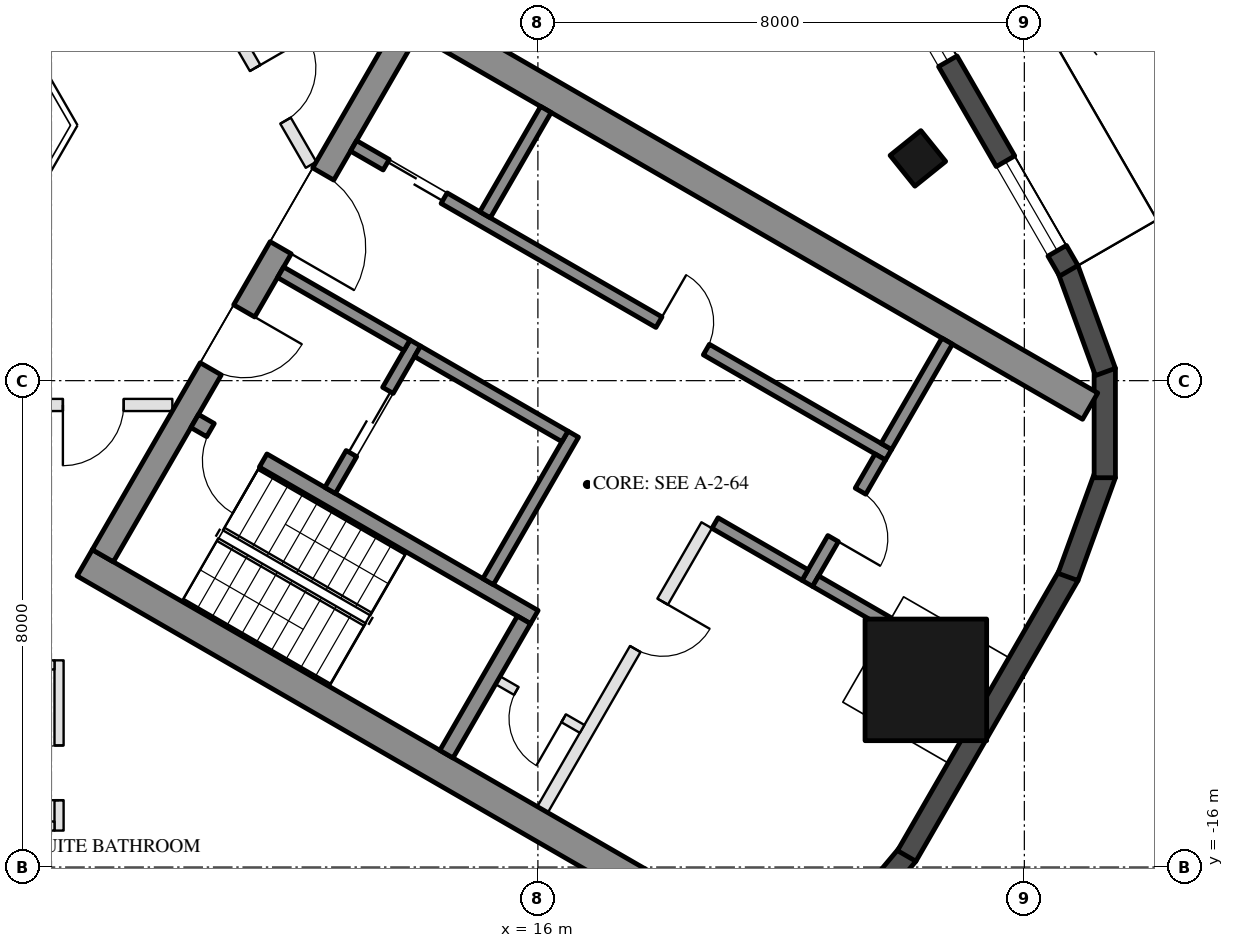
"""IFC4 building model, lengths in metres.
Left out: names, types, materials, properties, quantities, classifications, styles, units other than length and angle.
Written with IfcOpenShell. Run it as: python <this file> out.ifc"""

import sys

from ifc_helpers import new_model, si_unit, direction, frame, frame_2d, origin, origin_2d, place, context, subcontext, project, spatial, rectangle, hollow_rectangle, extrude, boolean, halfspace, element, fill, save


model = new_model("IFC4")
c1 = context("Model", 3, precision=1e-05, world=origin(), true_north=direction((0.0, 1.0)))
c2 = subcontext(c1, "Body", "Model", "MODEL_VIEW")
j1 = project(units=[si_unit("LENGTHUNIT", "METRE"), si_unit("PLANEANGLEUNIT", "RADIAN")], contexts=[c1])
p1 = place(None, origin())
s1 = spatial("IfcSite", under=j1, at=p1, CompositionType="ELEMENT")
p2 = place(p1, origin())
s2 = spatial("IfcBuilding", under=s1, at=p2, CompositionType="ELEMENT")
p3 = place(p2, frame((0.0, 0.0, 276.3)))
s3 = spatial("IfcBuildingStorey", under=s2, at=p3, CompositionType="ELEMENT", Elevation=276.3)
p4 = place(p3, frame((22.249, -4.345, 0.0), z_axis=(-0.190797858838, 0.029652330963, 0.981181388088), x_axis=(0.488223592572, -0.864281582532, 0.12105812551)))
e1 = element("IfcColumn", 1, at=p4, inside=s3, PredefinedType="COLUMN", context=c2, shape_type="SweptSolid", body=[
    boolean("DIFFERENCE", boolean("DIFFERENCE", extrude(hollow_rectangle(XDim=0.65, YDim=0.65, WallThickness=0.03, at=origin_2d()), origin(), (0.0, 0.0, 1.0), 3.771), halfspace(frame((0.0, 0.0, 0.047), z_axis=(0.0, 0.0, 1.0), x_axis=(1.0, 0.0, 0.0)), True)), halfspace(frame((0.0, 0.0, 3.724), z_axis=(0.0, 0.0, 1.0), x_axis=(1.0, 0.0, 0.0)), False)),
])
p5 = place(p3, frame((22.38, -12.921, 0.0), z_axis=(-0.190406849863, 0.109944185114, 0.975529347424), x_axis=(-0.499999219142, -0.866025854536, 1.1512328e-05)))
e2 = element("IfcColumn", 2, at=p5, inside=s3, PredefinedType="COLUMN", context=c2, shape_type="SweptSolid", body=[
    boolean("DIFFERENCE", boolean("DIFFERENCE", extrude(hollow_rectangle(XDim=2.0, YDim=2.0, WallThickness=0.05, at=origin_2d()), origin(), (0.0, 0.0, 1.0), 3.793), halfspace(frame((0.0, 0.0, 0.113), z_axis=(0.0, 0.0, 1.0), x_axis=(1.0, 0.0, 0.0)), True)), halfspace(frame((0.0, 0.0, 3.679), z_axis=(0.0, 0.0, 1.0), x_axis=(1.0, 0.0, 0.0)), False)),
])
p6 = place(p3, frame((20.926, -17.171, 0.0), z_axis=(0.0, 0.0, 1.0), x_axis=(0.642756114672, 0.766070869471, 0.0)))
e3 = element("IfcWall", 3, at=p6, inside=s3, PredefinedType="SOLIDWALL", context=c2, shape_type="SweptSolid", body=[
    extrude(rectangle(XDim=1.8, YDim=0.35, at=frame_2d((0.9, 0.0))), origin(), (0.0, 0.0, 1.0), 3.55),
])
p7 = place(p3, frame((22.065, -15.817, 0.0), z_axis=(0.0, 0.0, 1.0), x_axis=(0.500025039717, 0.866010946615, 0.0)))
e4 = element("IfcWall", 4, at=p7, inside=s3, PredefinedType="SOLIDWALL", context=c2, shape_type="SweptSolid", body=[
    extrude(rectangle(XDim=5.331, YDim=0.35, at=frame_2d((2.666, 0.0))), origin(), (0.0, 0.0, 1.0), 3.55),
])
p8 = place(p3, frame((24.718, -11.228, 0.0), z_axis=(0.0, 0.0, 1.0), x_axis=(0.34206975284, 0.939674562916, 0.0)))
e5 = element("IfcWall", 5, at=p8, inside=s3, PredefinedType="SOLIDWALL", context=c2, shape_type="SweptSolid", body=[
    extrude(rectangle(XDim=1.8, YDim=0.35, at=frame_2d((0.9, 0.0))), origin(), (0.0, 0.0, 1.0), 3.55),
])
p9 = place(p3, frame((25.323, -9.597, 0.0), z_axis=(0.0, 0.0, 1.0), x_axis=(0.0, 1.0, 0.0)))
e6 = element("IfcWall", 6, at=p9, inside=s3, PredefinedType="SOLIDWALL", context=c2, shape_type="SweptSolid", body=[
    extrude(rectangle(XDim=1.8, YDim=0.35, at=frame_2d((0.9, 0.0))), origin(), (0.0, 0.0, 1.0), 3.55),
])
p10 = place(p3, frame((25.333, -7.857, 0.0), z_axis=(0.0, 0.0, 1.0), x_axis=(-0.34206975284, 0.939674562916, 0.0)))
e7 = element("IfcWall", 7, at=p10, inside=s3, PredefinedType="SOLIDWALL", context=c2, shape_type="SweptSolid", body=[
    extrude(rectangle(XDim=1.8, YDim=0.35, at=frame_2d((0.9, 0.0))), origin(), (0.0, 0.0, 1.0), 3.55),
])
p11 = place(p3, frame((24.731, -6.193, 0.0), z_axis=(0.0, 0.0, 1.0), x_axis=(-0.500007749075, 0.866020929808, 0.0)))
e8 = element("IfcWall", 8, at=p11, inside=s3, PredefinedType="SOLIDWALL", context=c2, shape_type="SweptSolid", body=[
    extrude(rectangle(XDim=11.185, YDim=0.35, at=frame_2d((5.593, 0.0))), origin(), (0.0, 0.0, 1.0), 3.55),
])
p12 = place(p11, frame((0.381, 0.0, 0.3)))
e9 = element("IfcOpeningElement", 9, at=p12, cuts=e8, PredefinedType="OPENING", context=c2, shape_type="SweptSolid", body=[
    extrude(rectangle(XDim=1.7, YDim=2.65, at=frame_2d((0.85, 1.325))), frame((0.0, 0.185, 0.0), z_axis=(0.0, -1.0, 0.0), x_axis=(1.0, 0.0, 0.0)), (0.0, 0.0, 1.0), 0.37),
])
p13 = place(p11, frame((7.205, 0.0, 0.0)))
e10 = element("IfcOpeningElement", 10, at=p13, cuts=e8, PredefinedType="OPENING", context=c2, shape_type="SweptSolid", body=[
    extrude(rectangle(XDim=2.4, YDim=2.4, at=frame_2d((1.2, 1.2))), frame((0.0, 0.185, 0.0), z_axis=(0.0, -1.0, 0.0), x_axis=(1.0, 0.0, 0.0)), (0.0, 0.0, 1.0), 0.37),
])
p14 = place(p11, frame((3.979, 0.0, 0.3)))
e11 = element("IfcOpeningElement", 11, at=p14, cuts=e8, PredefinedType="OPENING", context=c2, shape_type="SweptSolid", body=[
    extrude(rectangle(XDim=2.9, YDim=2.65, at=frame_2d((1.45, 1.325))), frame((0.0, 0.185, 0.0), z_axis=(0.0, -1.0, 0.0), x_axis=(1.0, 0.0, 0.0)), (0.0, 0.0, 1.0), 0.37),
])
for number, where, z_axis, x_axis in (
    (12, (8.547, -10.997, 0.0), (0.0, 0.0, 1.0), (0.866, -0.5, 0.0)),
    (13, (13.797, -1.903, 0.0), (0.0, 0.0, 1.0), (0.866, -0.5, 0.0)),
):
    element("IfcWall", number, at=place(p3, frame(where, z_axis=z_axis, x_axis=x_axis)), inside=s3, PredefinedType="SHEAR", context=c2, shape_type="SweptSolid", body=[
        extrude(rectangle(XDim=13.031, YDim=0.5, at=frame_2d((6.516, 0.0))), origin(), (0.0, 0.0, 1.0), 3.5),
    ])
p15 = place(p3, frame((8.845, -10.88, 0.0), z_axis=(0.0, 0.0, 1.0), x_axis=(0.500004234368, 0.866022959057, 0.0)))
e14 = element("IfcWall", 14, at=p15, inside=s3, PredefinedType="SHEAR", context=c2, shape_type="SweptSolid", body=[
    extrude(rectangle(XDim=10.0, YDim=0.4, at=frame_2d((5.0, 0.0))), origin(), (0.0, 0.0, 1.0), 3.5),
])
p16 = place(p15, frame((3.55, 0.0, 0.0)))
e15 = element("IfcOpeningElement", 15, at=p16, cuts=e14, PredefinedType="OPENING", context=c2, shape_type="SweptSolid", body=[
    extrude(rectangle(XDim=1.1, YDim=2.1, at=frame_2d((0.55, 1.05))), frame((0.0, 0.21, 0.0), z_axis=(0.0, -1.0, 0.0), x_axis=(1.0, 0.0, 0.0)), (0.0, 0.0, 1.0), 0.42),
])
p17 = place(p15, frame((5.85, 0.0, 0.0)))
e16 = element("IfcOpeningElement", 16, at=p17, cuts=e14, PredefinedType="OPENING", context=c2, shape_type="SweptSolid", body=[
    extrude(rectangle(XDim=1.4, YDim=2.1, at=frame_2d((0.7, 1.05))), frame((0.0, 0.21, 0.0), z_axis=(0.0, -1.0, 0.0), x_axis=(1.0, 0.0, 0.0)), (0.0, 0.0, 1.0), 0.42),
])
p18 = place(p3, frame((10.356, -8.664, 0.0), z_axis=(0.0, 0.0, 1.0), x_axis=(0.866028629588, -0.499994412703, 0.0)))
e17 = element("IfcWall", 17, at=p18, inside=s3, PredefinedType="SHEAR", context=c2, shape_type="SweptSolid", body=[
    extrude(rectangle(XDim=6.45, YDim=0.25, at=frame_2d((3.225, 0.0))), origin(), (0.0, 0.0, 1.0), 3.5),
])
p19 = place(p18, frame((0.3, 0.0, 0.0)))
e18 = element("IfcOpeningElement", 18, at=p19, cuts=e17, PredefinedType="OPENING", context=c2, shape_type="SweptSolid", body=[
    extrude(rectangle(XDim=1.0, YDim=2.1, at=frame_2d((0.5, 1.05))), frame((0.0, 0.135, 0.0), z_axis=(0.0, -1.0, 0.0), x_axis=(1.0, 0.0, 0.0)), (0.0, 0.0, 1.0), 0.27),
])
p20 = place(p3, frame((14.496, -14.143, 0.0), z_axis=(0.0, 0.0, 1.0), x_axis=(0.500062241894, 0.865989465428, 0.0)))
e19 = element("IfcWall", 19, at=p20, inside=s3, PredefinedType="SHEAR", context=c2, shape_type="SweptSolid", body=[
    extrude(rectangle(XDim=2.55, YDim=0.25, at=frame_2d((1.275, 0.0))), origin(), (0.0, 0.0, 1.0), 3.5),
])
p21 = place(p3, frame((15.181, -11.305, 0.0), z_axis=(0.0, 0.0, 1.0), x_axis=(0.49994636267, 0.866056369097, 0.0)))
e20 = element("IfcWall", 20, at=p21, inside=s3, PredefinedType="SHEAR", context=c2, shape_type="SweptSolid", body=[
    extrude(rectangle(XDim=2.8, YDim=0.2, at=frame_2d((1.4, 0.0))), origin(), (0.0, 0.0, 1.0), 3.5),
])
p22 = place(p3, frame((12.583, -9.805, 0.0), z_axis=(0.0, 0.0, 1.0), x_axis=(0.49994636267, 0.866056369097, 0.0)))
e21 = element("IfcWall", 21, at=p22, inside=s3, PredefinedType="SHEAR", context=c2, shape_type="SweptSolid", body=[
    extrude(rectangle(XDim=2.8, YDim=0.2, at=frame_2d((1.4, 0.0))), origin(), (0.0, 0.0, 1.0), 3.5),
])
p23 = place(p22, frame((0.7, 0.0, 0.0)))
e22 = element("IfcOpeningElement", 22, at=p23, cuts=e21, PredefinedType="OPENING", context=c2, shape_type="SweptSolid", body=[
    extrude(rectangle(XDim=1.2, YDim=2.1, at=frame_2d((0.6, 1.05))), frame((0.0, 0.11, 0.0), z_axis=(0.0, -1.0, 0.0), x_axis=(1.0, 0.0, 0.0)), (0.0, 0.0, 1.0), 0.22),
])
p24 = place(p3, frame((11.768, -6.217, 0.0), z_axis=(0.0, 0.0, 1.0), x_axis=(0.866050077142, -0.499957262057, 0.0)))
e23 = element("IfcWall", 23, at=p24, inside=s3, PredefinedType="SHEAR", context=c2, shape_type="SweptSolid", body=[
    extrude(rectangle(XDim=2.4, YDim=0.2, at=frame_2d((1.2, 0.0))), origin(), (0.0, 0.0, 1.0), 3.5),
])
p25 = place(p3, frame((14.02, -7.517, 0.0), z_axis=(0.0, 0.0, 1.0), x_axis=(0.866034573852, -0.49998411664, 0.0)))
e24 = element("IfcWall", 24, at=p25, inside=s3, PredefinedType="SHEAR", context=c2, shape_type="SweptSolid", body=[
    extrude(rectangle(XDim=2.8, YDim=0.2, at=frame_2d((1.4, 0.0))), origin(), (0.0, 0.0, 1.0), 3.5),
])
p26 = place(p3, frame((12.968, -4.138, 0.0), z_axis=(0.0, 0.0, 1.0), x_axis=(0.866028328073, -0.49999493495, 0.0)))
e25 = element("IfcWall", 25, at=p26, inside=s3, PredefinedType="SHEAR", context=c2, shape_type="SweptSolid", body=[
    extrude(rectangle(XDim=10.16, YDim=0.2, at=frame_2d((5.08, 0.0))), origin(), (0.0, 0.0, 1.0), 3.5),
])
p27 = place(p26, frame((0.62, 0.0, 0.0)))
e26 = element("IfcOpeningElement", 26, at=p27, cuts=e25, PredefinedType="OPENING", context=c2, shape_type="SweptSolid", body=[
    extrude(rectangle(XDim=1.1, YDim=2.1, at=frame_2d((0.55, 1.05))), frame((0.0, 0.11, 0.0), z_axis=(0.0, -1.0, 0.0), x_axis=(1.0, 0.0, 0.0)), (0.0, 0.0, 1.0), 0.22),
])
p28 = place(p26, frame((5.8, 0.0, 0.0)))
e27 = element("IfcOpeningElement", 27, at=p28, cuts=e25, PredefinedType="OPENING", context=c2, shape_type="SweptSolid", body=[
    extrude(rectangle(XDim=0.9, YDim=2.1, at=frame_2d((0.45, 1.05))), frame((0.0, 0.11, 0.0), z_axis=(0.0, -1.0, 0.0), x_axis=(1.0, 0.0, 0.0)), (0.0, 0.0, 1.0), 0.22),
])
p29 = place(p3, frame((20.43, -11.333, 0.0), z_axis=(0.0, 0.0, 1.0), x_axis=(0.500001309137, 0.866024647952, 0.0)))
e28 = element("IfcWall", 28, at=p29, inside=s3, PredefinedType="SHEAR", context=c2, shape_type="SweptSolid", body=[
    extrude(rectangle(XDim=2.4, YDim=0.2, at=frame_2d((1.2, 0.0))), origin(), (0.0, 0.0, 1.0), 3.5),
])
p30 = place(p29, frame((0.85, 0.0, 0.0)))
e29 = element("IfcOpeningElement", 29, at=p30, cuts=e28, PredefinedType="OPENING", context=c2, shape_type="SweptSolid", body=[
    extrude(rectangle(XDim=0.9, YDim=2.1, at=frame_2d((0.45, 1.05))), frame((0.0, 0.11, 0.0), z_axis=(0.0, -1.0, 0.0), x_axis=(1.0, 0.0, 0.0)), (0.0, 0.0, 1.0), 0.22),
])
p31 = place(p3, frame((18.913, -10.342, 0.0), z_axis=(0.0, 0.0, 1.0), x_axis=(0.866038183914, -0.499977863513, 0.0)))
e30 = element("IfcWall", 30, at=p31, inside=s3, PredefinedType="SHEAR", context=c2, shape_type="SweptSolid", body=[
    extrude(rectangle(XDim=1.71, YDim=0.2, at=frame_2d((0.855, 0.0))), origin(), (0.0, 0.0, 1.0), 3.5),
])
for number, where, z_axis, x_axis in (
    (31, (15.131, -5.272, 0.0), (0.0, 0.0, 1.0), (0.5, 0.866, 0.0)),
    (32, (21.73, -9.082, 0.0), (0.0, 0.0, 1.0), (0.5, 0.866, 0.0)),
):
    element("IfcWall", number, at=place(p3, frame(where, z_axis=z_axis, x_axis=x_axis)), inside=s3, PredefinedType="SHEAR", context=c2, shape_type="SweptSolid", body=[
        extrude(rectangle(XDim=2.0, YDim=0.2, at=frame_2d((1.0, 0.0))), origin(), (0.0, 0.0, 1.0), 3.5),
    ])
p32 = place(p3, frame((20.567, -11.297, 0.0), z_axis=(0.0, 0.0, 1.0), x_axis=(0.866094443108, -0.499880401313, 0.0)))
e33 = element("IfcWall", 33, at=p32, inside=s3, PredefinedType="SHEAR", context=c2, shape_type="SweptSolid", body=[
    extrude(rectangle(XDim=1.383, YDim=0.2, at=frame_2d((0.691, 0.0))), origin(), (0.0, 0.0, 1.0), 3.5),
])
p33 = place(p3, frame((16.076, -15.055, 0.0), z_axis=(0.0, 0.0, 1.0), x_axis=(0.499995103361, 0.866028230842, 0.0)))
e34 = element("IfcWall", 34, at=p33, inside=s3, PredefinedType="PARTITIONING", context=c2, shape_type="SweptSolid", body=[
    extrude(rectangle(XDim=5.4, YDim=0.2, at=frame_2d((2.7, 0.0))), origin(), (0.0, 0.0, 1.0), 3.5),
])
p34 = place(p33, frame((3.05, 0.0, 0.0)))
e35 = element("IfcOpeningElement", 35, at=p34, cuts=e34, PredefinedType="OPENING", context=c2, shape_type="SweptSolid", body=[
    extrude(rectangle(XDim=0.9, YDim=2.1, at=frame_2d((0.45, 1.05))), frame((0.0, 0.11, 0.0), z_axis=(0.0, -1.0, 0.0), x_axis=(1.0, 0.0, 0.0)), (0.0, 0.0, 1.0), 0.22),
])
p35 = place(p3, frame((15.342, -12.928, 0.0), z_axis=(0.0, 0.0, 1.0), x_axis=(0.865989903783, -0.500061482766, 0.0)))
e36 = element("IfcWall", 36, at=p35, inside=s3, PredefinedType="PARTITIONING", context=c2, shape_type="SweptSolid", body=[
    extrude(rectangle(XDim=1.6, YDim=0.15, at=frame_2d((0.8, 0.0))), origin(), (0.0, 0.0, 1.0), 3.5),
])
p36 = place(p35, frame((0.35, 0.0, 0.0)))
e37 = element("IfcOpeningElement", 37, at=p36, cuts=e36, PredefinedType="OPENING", context=c2, shape_type="SweptSolid", body=[
    extrude(rectangle(XDim=0.9, YDim=2.1, at=frame_2d((0.45, 1.05))), frame((0.0, 0.085, 0.0), z_axis=(0.0, -1.0, 0.0), x_axis=(1.0, 0.0, 0.0)), (0.0, 0.0, 1.0), 0.17),
])
p37 = place(p3, frame((9.988, -8.4, 0.0), z_axis=(0.0, 0.0, 1.0), x_axis=(-1.0, 0.0, 0.0)))
e38 = element("IfcWall", 38, at=p37, inside=s3, PredefinedType="PARTITIONING", context=c2, shape_type="SweptSolid", body=[
    extrude(rectangle(XDim=3.788, YDim=0.2, at=frame_2d((1.894, 0.0))), origin(), (0.0, 0.0, 1.0), 3.05),
])
p38 = place(p37, frame((0.8, 0.0, 0.0)))
e39 = element("IfcOpeningElement", 39, at=p38, cuts=e38, PredefinedType="OPENING", context=c2, shape_type="SweptSolid", body=[
    extrude(rectangle(XDim=1.0, YDim=2.1, at=frame_2d((0.5, 1.05))), frame((0.0, 0.11, 0.0), z_axis=(0.0, -1.0, 0.0), x_axis=(1.0, 0.0, 0.0)), (0.0, 0.0, 1.0), 0.22),
])
p39 = place(p3, frame((8.125, -15.4, 0.0), z_axis=(0.0, 0.0, 1.0), x_axis=(0.0, 1.0, 0.0)))
e40 = element("IfcWall", 40, at=p39, inside=s3, PredefinedType="PARTITIONING", context=c2, shape_type="SweptSolid", body=[
    extrude(rectangle(XDim=2.8, YDim=0.15, at=frame_2d((1.4, 0.0))), origin(), (0.0, 0.0, 1.0), 3.55),
])
p40 = place(p39, frame((0.5, 0.0, 0.0)))
e41 = element("IfcOpeningElement", 41, at=p40, cuts=e40, PredefinedType="OPENING", context=c2, shape_type="SweptSolid", body=[
    extrude(rectangle(XDim=0.9, YDim=2.1, at=frame_2d((0.45, 1.05))), frame((0.0, 0.085, 0.0), z_axis=(0.0, -1.0, 0.0), x_axis=(1.0, 0.0, 0.0)), (0.0, 0.0, 1.0), 0.17),
])
for number, where, z_axis, x_axis in (
    (42, (6.2, -15.325, 0.0), (0.0, 0.0, 1.0), (1.0, 0.0, 0.0)),
    (43, (6.2, -12.675, 0.0), (0.0, 0.0, 1.0), (1.0, 0.0, 0.0)),
):
    element("IfcWall", number, at=place(p3, frame(where, z_axis=z_axis, x_axis=x_axis)), inside=s3, PredefinedType="PARTITIONING", context=c2, shape_type="SweptSolid", body=[
        extrude(rectangle(XDim=1.85, YDim=0.15, at=frame_2d((0.925, 0.0))), origin(), (0.0, 0.0, 1.0), 3.05),
    ])
p41 = place(p3, frame((10.375, -1.169, 0.0), z_axis=(0.0, 0.0, 1.0), x_axis=(0.500055316652, -0.865993464345, 0.0)))
e44 = element("IfcWall", 44, at=p41, inside=s3, PredefinedType="PARTITIONING", context=c2, shape_type="SweptSolid", body=[
    extrude(rectangle(XDim=3.788, YDim=0.2, at=frame_2d((1.894, 0.0))), origin(), (0.0, 0.0, 1.0), 3.05),
])
p42 = place(p41, frame((1.95, 0.0, 0.0)))
e45 = element("IfcOpeningElement", 45, at=p42, cuts=e44, PredefinedType="OPENING", context=c2, shape_type="SweptSolid", body=[
    extrude(rectangle(XDim=1.0, YDim=2.1, at=frame_2d((0.5, 1.05))), frame((0.0, 0.11, 0.0), z_axis=(0.0, -1.0, 0.0), x_axis=(1.0, 0.0, 0.0)), (0.0, 0.0, 1.0), 0.22),
])
p43 = place(p12, origin())
e46 = element("IfcWindow", 46, at=p43, inside=s3, PartitioningType="SINGLE_PANEL", PredefinedType="WINDOW", context=c2, shape_type="SweptSolid", body=[
    extrude(rectangle(XDim=1.7, YDim=2.65, at=frame_2d((0.85, 1.325))), frame((0.0, 0.03, 0.0), z_axis=(0.0, -1.0, 0.0), x_axis=(1.0, 0.0, 0.0)), (0.0, 0.0, 1.0), 0.06),
])
fill(e9, e46)
p44 = place(p14, origin())
e47 = element("IfcWindow", 47, at=p44, inside=s3, PartitioningType="SINGLE_PANEL", PredefinedType="WINDOW", context=c2, shape_type="SweptSolid", body=[
    extrude(rectangle(XDim=2.9, YDim=2.65, at=frame_2d((1.45, 1.325))), frame((0.0, 0.03, 0.0), z_axis=(0.0, -1.0, 0.0), x_axis=(1.0, 0.0, 0.0)), (0.0, 0.0, 1.0), 0.06),
])
fill(e11, e47)
p45 = place(p23, origin())
e48 = element("IfcDoor", 48, at=p45, inside=s3, OperationType="DOUBLE_DOOR_SLIDING", PredefinedType="DOOR", context=c2, shape_type="SweptSolid", body=[
    extrude(rectangle(XDim=1.2, YDim=2.1, at=frame_2d((0.6, 1.05))), frame((0.0, 0.025, 0.0), z_axis=(0.0, -1.0, 0.0), x_axis=(1.0, 0.0, 0.0)), (0.0, 0.0, 1.0), 0.05),
])
fill(e22, e48)
p46 = place(p36, frame((0.9, 0.0, 0.0), z_axis=(0.0, 0.0, 1.0), x_axis=(-1.0, 0.0, 0.0)))
e49 = element("IfcDoor", 49, at=p46, inside=s3, OperationType="SINGLE_SWING_LEFT", PredefinedType="DOOR", context=c2, shape_type="SweptSolid", body=[
    extrude(rectangle(XDim=0.9, YDim=2.1, at=frame_2d((0.45, 1.05))), frame((0.0, 0.025, 0.0), z_axis=(0.0, -1.0, 0.0), x_axis=(1.0, 0.0, 0.0)), (0.0, 0.0, 1.0), 0.05),
])
fill(e37, e49)
p47 = place(p27, origin())
e50 = element("IfcDoor", 50, at=p47, inside=s3, OperationType="DOUBLE_DOOR_SLIDING", PredefinedType="DOOR", context=c2, shape_type="SweptSolid", body=[
    extrude(rectangle(XDim=1.1, YDim=2.1, at=frame_2d((0.55, 1.05))), frame((0.0, 0.025, 0.0), z_axis=(0.0, -1.0, 0.0), x_axis=(1.0, 0.0, 0.0)), (0.0, 0.0, 1.0), 0.05),
])
fill(e26, e50)
p48 = place(p28, origin())
e51 = element("IfcDoor", 51, at=p48, inside=s3, OperationType="SINGLE_SWING_LEFT", PredefinedType="DOOR", context=c2, shape_type="SweptSolid", body=[
    extrude(rectangle(XDim=0.9, YDim=2.1, at=frame_2d((0.45, 1.05))), frame((0.0, 0.025, 0.0), z_axis=(0.0, -1.0, 0.0), x_axis=(1.0, 0.0, 0.0)), (0.0, 0.0, 1.0), 0.05),
])
fill(e27, e51)
p49 = place(p30, frame((0.9, 0.0, 0.0), z_axis=(0.0, 0.0, 1.0), x_axis=(-1.0, 0.0, 0.0)))
e52 = element("IfcDoor", 52, at=p49, inside=s3, OperationType="SINGLE_SWING_RIGHT", PredefinedType="DOOR", context=c2, shape_type="SweptSolid", body=[
    extrude(rectangle(XDim=0.9, YDim=2.1, at=frame_2d((0.45, 1.05))), frame((0.0, 0.025, 0.0), z_axis=(0.0, -1.0, 0.0), x_axis=(1.0, 0.0, 0.0)), (0.0, 0.0, 1.0), 0.05),
])
fill(e29, e52)
p50 = place(p34, frame((0.9, 0.0, 0.0), z_axis=(0.0, 0.0, 1.0), x_axis=(-1.0, 0.0, 0.0)))
e53 = element("IfcDoor", 53, at=p50, inside=s3, OperationType="SINGLE_SWING_LEFT", PredefinedType="DOOR", context=c2, shape_type="SweptSolid", body=[
    extrude(rectangle(XDim=0.9, YDim=2.1, at=frame_2d((0.45, 1.05))), frame((0.0, 0.025, 0.0), z_axis=(0.0, -1.0, 0.0), x_axis=(1.0, 0.0, 0.0)), (0.0, 0.0, 1.0), 0.05),
])
fill(e35, e53)
p51 = place(p16, frame((1.1, 0.0, 0.0), z_axis=(0.0, 0.0, 1.0), x_axis=(-1.0, 0.0, 0.0)))
e54 = element("IfcDoor", 54, at=p51, inside=s3, OperationType="SINGLE_SWING_LEFT", PredefinedType="DOOR", context=c2, shape_type="SweptSolid", body=[
    extrude(rectangle(XDim=1.1, YDim=2.1, at=frame_2d((0.55, 1.05))), frame((0.0, 0.025, 0.0), z_axis=(0.0, -1.0, 0.0), x_axis=(1.0, 0.0, 0.0)), (0.0, 0.0, 1.0), 0.05),
])
fill(e15, e54)
p52 = place(p17, frame((1.4, 0.0, 0.0), z_axis=(0.0, 0.0, 1.0), x_axis=(-1.0, 0.0, 0.0)))
e55 = element("IfcDoor", 55, at=p52, inside=s3, OperationType="DOUBLE_DOOR_SINGLE_SWING", PredefinedType="DOOR", context=c2, shape_type="SweptSolid", body=[
    extrude(rectangle(XDim=1.4, YDim=2.1, at=frame_2d((0.7, 1.05))), frame((0.0, 0.025, 0.0), z_axis=(0.0, -1.0, 0.0), x_axis=(1.0, 0.0, 0.0)), (0.0, 0.0, 1.0), 0.05),
])
fill(e16, e55)
p53 = place(p19, frame((1.0, 0.0, 0.0), z_axis=(0.0, 0.0, 1.0), x_axis=(-1.0, 0.0, 0.0)))
e56 = element("IfcDoor", 56, at=p53, inside=s3, OperationType="SINGLE_SWING_LEFT", PredefinedType="DOOR", context=c2, shape_type="SweptSolid", body=[
    extrude(rectangle(XDim=1.0, YDim=2.1, at=frame_2d((0.5, 1.05))), frame((0.0, 0.025, 0.0), z_axis=(0.0, -1.0, 0.0), x_axis=(1.0, 0.0, 0.0)), (0.0, 0.0, 1.0), 0.05),
])
fill(e18, e56)
p54 = place(p40, origin())
e57 = element("IfcDoor", 57, at=p54, inside=s3, OperationType="SINGLE_SWING_LEFT", PredefinedType="DOOR", context=c2, shape_type="SweptSolid", body=[
    extrude(rectangle(XDim=0.9, YDim=2.1, at=frame_2d((0.45, 1.05))), frame((0.0, 0.025, 0.0), z_axis=(0.0, -1.0, 0.0), x_axis=(1.0, 0.0, 0.0)), (0.0, 0.0, 1.0), 0.05),
])
fill(e41, e57)
p55 = place(p38, origin())
e58 = element("IfcDoor", 58, at=p55, inside=s3, OperationType="SINGLE_SWING_RIGHT", PredefinedType="DOOR", context=c2, shape_type="SweptSolid", body=[
    extrude(rectangle(XDim=1.0, YDim=2.1, at=frame_2d((0.5, 1.05))), frame((0.0, 0.025, 0.0), z_axis=(0.0, -1.0, 0.0), x_axis=(1.0, 0.0, 0.0)), (0.0, 0.0, 1.0), 0.05),
])
fill(e39, e58)
p56 = place(p42, origin())
e59 = element("IfcDoor", 59, at=p56, inside=s3, OperationType="SINGLE_SWING_LEFT", PredefinedType="DOOR", context=c2, shape_type="SweptSolid", body=[
    extrude(rectangle(XDim=1.0, YDim=2.1, at=frame_2d((0.5, 1.05))), frame((0.0, 0.025, 0.0), z_axis=(0.0, -1.0, 0.0), x_axis=(1.0, 0.0, 0.0)), (0.0, 0.0, 1.0), 0.05),
])
fill(e45, e59)
save(model, sys.argv[1])
